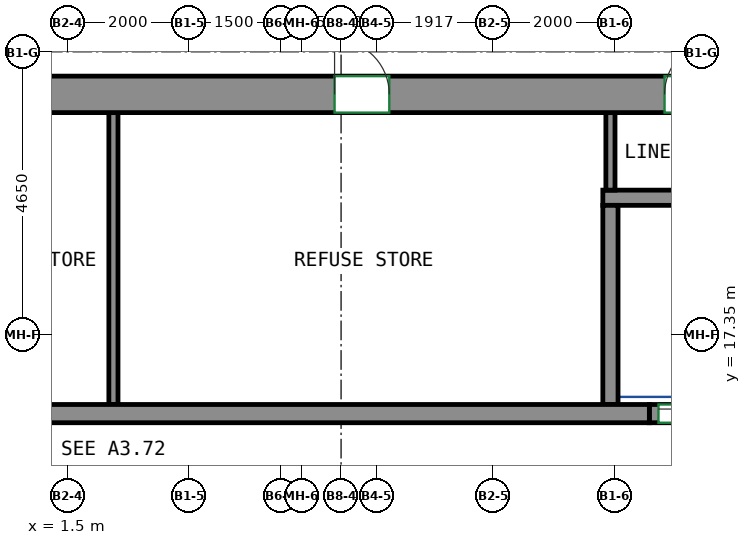
"""IFC4 building model, lengths in metres.
Left out: names, types, materials, properties, quantities, classifications, styles, units other than length and angle.
Written with IfcOpenShell. Run it as: python <this file> out.ifc"""

import sys

from ifc_helpers import new_model, si_unit, direction, frame, frame_2d, origin, place, context, subcontext, project, spatial, rectangle, extrude, source, transform, mapped, element, fill, save


model = new_model("IFC4")
c1 = context("Model", 3, precision=1e-05, world=origin(), true_north=direction((0.0, 1.0)))
c2 = subcontext(c1, "Body", "Model", "MODEL_VIEW")
j1 = project(units=[si_unit("LENGTHUNIT", "METRE"), si_unit("PLANEANGLEUNIT", "RADIAN")], contexts=[c1])
p1 = place(None, origin())
s1 = spatial("IfcSite", under=j1, at=p1, CompositionType="ELEMENT")
p2 = place(p1, origin())
s2 = spatial("IfcBuilding", under=s1, at=p2, CompositionType="ELEMENT")
p3 = place(p2, frame((0.0, 0.0, 287.4)))
s3 = spatial("IfcBuildingStorey", under=s2, at=p3, CompositionType="ELEMENT", Elevation=287.4)
m1 = source(origin(), c2, "Body", "SweptSolid", [
    extrude(rectangle(XDim=33.3, YDim=0.6, at=frame_2d((16.65, 0.0))), origin(), (0.0, 0.0, 1.0), 3.0),
])
p4 = place(p3, frame((-15.6, 21.3, 0.0), z_axis=(0.0, 0.0, 1.0), x_axis=(1.0, 0.0, 0.0)))
e1 = element("IfcWall", 1, at=p4, inside=s3, PredefinedType="SHEAR", context=c2, shape_type="MappedRepresentation", body=[
    mapped(m1, transform((0.0, 0.0, 0.0))),
])
p5 = place(p4, frame((5.708, 0.0, 0.0)))
e2 = element("IfcOpeningElement", 2, at=p5, cuts=e1, PredefinedType="OPENING", context=c2, shape_type="SweptSolid", body=[
    extrude(rectangle(XDim=0.9, YDim=2.1, at=frame_2d((0.45, 1.05))), frame((0.0, 0.31, 0.0), z_axis=(0.0, -1.0, 0.0), x_axis=(1.0, 0.0, 0.0)), (0.0, 0.0, 1.0), 0.62),
])
p6 = place(p4, frame((10.773, 0.0, 0.0)))
e3 = element("IfcOpeningElement", 3, at=p6, cuts=e1, PredefinedType="OPENING", context=c2, shape_type="SweptSolid", body=[
    extrude(rectangle(XDim=0.9, YDim=2.1, at=frame_2d((0.45, 1.05))), frame((0.0, 0.31, 0.0), z_axis=(0.0, -1.0, 0.0), x_axis=(1.0, 0.0, 0.0)), (0.0, 0.0, 1.0), 0.62),
])
p7 = place(p4, frame((15.838, 0.0, 0.0)))
e4 = element("IfcOpeningElement", 4, at=p7, cuts=e1, PredefinedType="OPENING", context=c2, shape_type="SweptSolid", body=[
    extrude(rectangle(XDim=0.9, YDim=2.1, at=frame_2d((0.45, 1.05))), frame((0.0, 0.31, 0.0), z_axis=(0.0, -1.0, 0.0), x_axis=(1.0, 0.0, 0.0)), (0.0, 0.0, 1.0), 0.62),
])
p8 = place(p4, frame((21.493, 0.0, 0.0)))
e5 = element("IfcOpeningElement", 5, at=p8, cuts=e1, PredefinedType="OPENING", context=c2, shape_type="SweptSolid", body=[
    extrude(rectangle(XDim=0.9, YDim=2.1, at=frame_2d((0.45, 1.05))), frame((0.0, 0.31, 0.0), z_axis=(0.0, -1.0, 0.0), x_axis=(1.0, 0.0, 0.0)), (0.0, 0.0, 1.0), 0.62),
])
p9 = place(p4, frame((26.92, 0.0, 0.0)))
e6 = element("IfcOpeningElement", 6, at=p9, cuts=e1, PredefinedType="OPENING", context=c2, shape_type="SweptSolid", body=[
    extrude(rectangle(XDim=0.9, YDim=2.1, at=frame_2d((0.45, 1.05))), frame((0.0, 0.31, 0.0), z_axis=(0.0, -1.0, 0.0), x_axis=(1.0, 0.0, 0.0)), (0.0, 0.0, 1.0), 0.62),
])
p10 = place(p4, frame((2.125, 0.0, 0.0)))
e7 = element("IfcOpeningElement", 7, at=p10, cuts=e1, PredefinedType="OPENING", context=c2, shape_type="SweptSolid", body=[
    extrude(rectangle(XDim=0.9, YDim=2.1, at=frame_2d((0.45, 1.05))), frame((0.0, 0.31, 0.0), z_axis=(0.0, -1.0, 0.0), x_axis=(1.0, 0.0, 0.0)), (0.0, 0.0, 1.0), 0.62),
])
p11 = place(p4, frame((30.275, 0.0, 0.0)))
e8 = element("IfcOpeningElement", 8, at=p11, cuts=e1, PredefinedType="OPENING", context=c2, shape_type="SweptSolid", body=[
    extrude(rectangle(XDim=0.9, YDim=2.1, at=frame_2d((0.45, 1.05))), frame((0.0, 0.31, 0.0), z_axis=(0.0, -1.0, 0.0), x_axis=(1.0, 0.0, 0.0)), (0.0, 0.0, 1.0), 0.62),
])
m2 = source(origin(), c2, "Body", "SweptSolid", [
    extrude(rectangle(XDim=22.08, YDim=0.3, at=frame_2d((11.04, 0.0))), origin(), (0.0, 0.0, 1.0), 3.0),
])
p12 = place(p3, frame((-11.01, 16.05, 0.0), z_axis=(0.0, 0.0, 1.0), x_axis=(1.0, 0.0, 0.0)))
e9 = element("IfcWall", 9, at=p12, inside=s3, PredefinedType="SHEAR", context=c2, shape_type="MappedRepresentation", body=[
    mapped(m2, transform((0.0, 0.0, 0.0))),
])
m3 = source(origin(), c2, "Body", "SweptSolid", [
    extrude(rectangle(XDim=1.4, YDim=0.3, at=frame_2d((0.7, 0.0))), origin(), (0.0, 0.0, 1.0), 3.0),
])
p13 = place(p3, frame((11.07, 16.05, 0.0), z_axis=(0.0, 0.0, 1.0), x_axis=(1.0, 0.0, 0.0)))
e10 = element("IfcWall", 10, at=p13, inside=s3, PredefinedType="PARTITIONING", context=c2, shape_type="MappedRepresentation", body=[
    mapped(m3, transform((0.0, 0.0, 0.0))),
])
p14 = place(p13, frame((0.15, 0.0, 0.0)))
e11 = element("IfcOpeningElement", 11, at=p14, cuts=e10, PredefinedType="OPENING", context=c2, shape_type="SweptSolid", body=[
    extrude(rectangle(XDim=1.1, YDim=2.1, at=frame_2d((0.55, 1.05))), frame((0.0, 0.16, 0.0), z_axis=(0.0, -1.0, 0.0), x_axis=(1.0, 0.0, 0.0)), (0.0, 0.0, 1.0), 0.32),
])
m4 = source(origin(), c2, "Body", "SweptSolid", [
    extrude(rectangle(XDim=2.93, YDim=0.25, at=frame_2d((1.465, 0.0))), origin(), (0.0, 0.0, 1.0), 3.0),
])
p15 = place(p3, frame((10.305, 19.6, 0.0), z_axis=(0.0, 0.0, 1.0), x_axis=(1.0, 0.0, 0.0)))
e12 = element("IfcWall", 12, at=p15, inside=s3, PredefinedType="PARTITIONING", context=c2, shape_type="MappedRepresentation", body=[
    mapped(m4, transform((0.0, 0.0, 0.0))),
])
m5 = source(origin(), c2, "Body", "SweptSolid", [
    extrude(rectangle(XDim=3.275, YDim=0.25, at=frame_2d((1.638, 0.0))), origin(), (0.0, 0.0, 1.0), 3.0),
])
p16 = place(p3, frame((10.43, 16.2, 0.0), z_axis=(0.0, 0.0, 1.0), x_axis=(0.0, 1.0, 0.0)))
e13 = element("IfcWall", 13, at=p16, inside=s3, PredefinedType="PARTITIONING", context=c2, shape_type="MappedRepresentation", body=[
    mapped(m5, transform((0.0, 0.0, 0.0))),
])
m6 = source(origin(), c2, "Body", "SweptSolid", [
    extrude(rectangle(XDim=4.8, YDim=0.15, at=frame_2d((2.4, 0.0))), origin(), (0.0, 0.0, 1.0), 3.0),
])
p17 = place(p3, frame((2.256, 16.2, 0.0), z_axis=(0.0, 0.0, 1.0), x_axis=(0.0, 1.0, 0.0)))
e14 = element("IfcWall", 14, at=p17, inside=s3, PredefinedType="PARTITIONING", context=c2, shape_type="MappedRepresentation", body=[
    mapped(m6, transform((0.0, 0.0, 0.0))),
])
m7 = source(origin(), c2, "Body", "SweptSolid", [
    extrude(rectangle(XDim=1.275, YDim=0.15, at=frame_2d((0.637, 0.0))), origin(), (0.0, 0.0, 1.0), 3.0),
])
p18 = place(p3, frame((10.43, 19.725, 0.0), z_axis=(0.0, 0.0, 1.0), x_axis=(0.0, 1.0, 0.0)))
e15 = element("IfcWall", 15, at=p18, inside=s3, PredefinedType="PARTITIONING", context=c2, shape_type="MappedRepresentation", body=[
    mapped(m7, transform((0.0, 0.0, 0.0))),
])
p19 = place(p14, origin())
e16 = element("IfcDoor", 16, at=p19, inside=s3, OperationType="DOUBLE_DOOR_SLIDING", PredefinedType="DOOR", context=c2, shape_type="SweptSolid", body=[
    extrude(rectangle(XDim=1.1, YDim=2.1, at=frame_2d((0.55, 1.05))), frame((0.0, 0.025, 0.0), z_axis=(0.0, -1.0, 0.0), x_axis=(1.0, 0.0, 0.0)), (0.0, 0.0, 1.0), 0.05),
])
fill(e11, e16)
p20 = place(p8, origin())
e17 = element("IfcDoor", 17, at=p20, inside=s3, OperationType="SINGLE_SWING_LEFT", PredefinedType="DOOR", context=c2, shape_type="SweptSolid", body=[
    extrude(rectangle(XDim=0.9, YDim=2.1, at=frame_2d((0.45, 1.05))), frame((0.0, -0.155, 0.0), z_axis=(0.0, -1.0, 0.0), x_axis=(1.0, 0.0, 0.0)), (0.0, 0.0, 1.0), 0.05),
])
fill(e5, e17)
p21 = place(p9, origin())
e18 = element("IfcDoor", 18, at=p21, inside=s3, OperationType="SINGLE_SWING_RIGHT", PredefinedType="DOOR", context=c2, shape_type="SweptSolid", body=[
    extrude(rectangle(XDim=0.9, YDim=2.1, at=frame_2d((0.45, 1.05))), frame((0.0, -0.155, 0.0), z_axis=(0.0, -1.0, 0.0), x_axis=(1.0, 0.0, 0.0)), (0.0, 0.0, 1.0), 0.05),
])
fill(e6, e18)
save(model, sys.argv[1])
